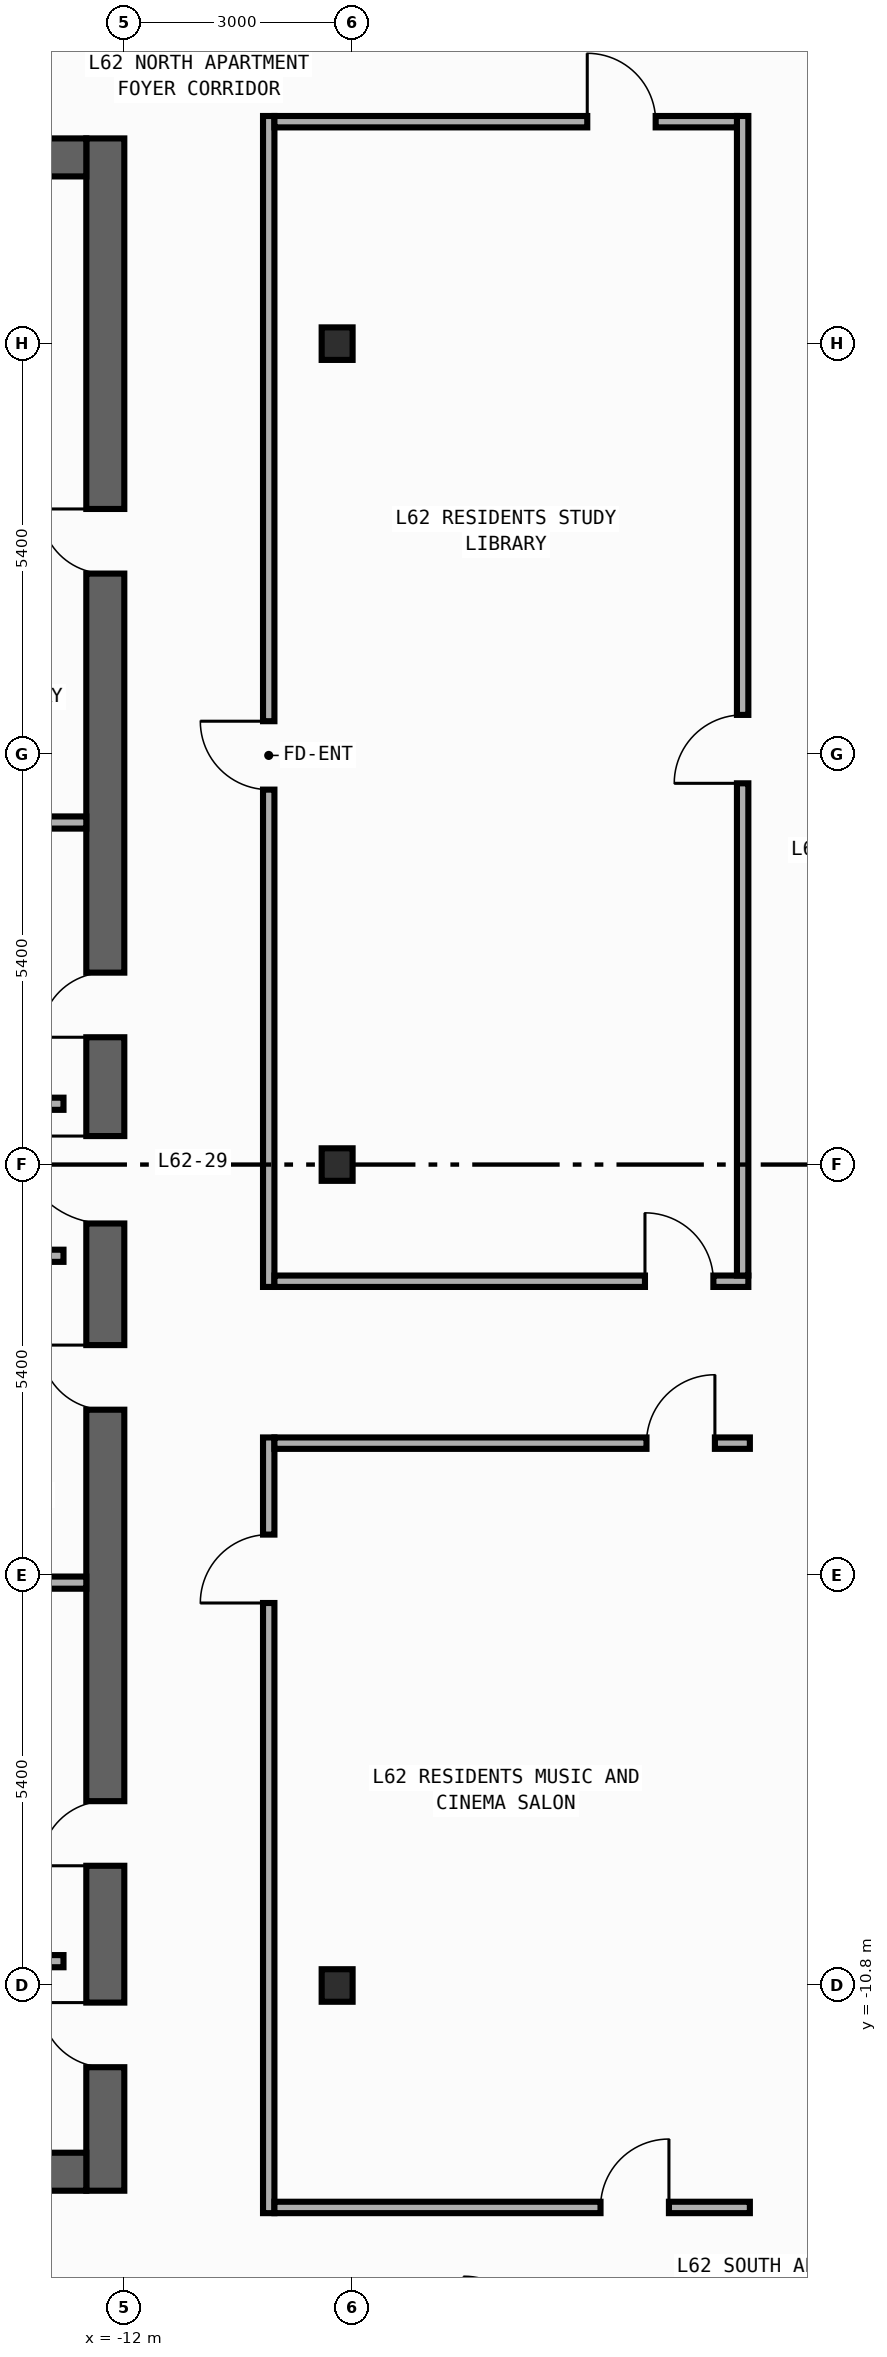
"""IFC4 building model, lengths in metres.
Left out: names, types, materials, properties, quantities, classifications, styles, units other than length and angle.
Written with IfcOpenShell. Run it as: python <this file> out.ifc"""

import sys

from ifc_helpers import new_model, si_unit, direction, frame, frame_2d, origin, origin_2d, place, context, subcontext, project, spatial, rectangle, i_section, extrude, element, fill, save


model = new_model("IFC4")
c1 = context("Model", 3, precision=1e-05, world=origin(), true_north=direction((0.0, 1.0)))
c2 = subcontext(c1, "Body", "Model", "MODEL_VIEW")
j1 = project(units=[si_unit("LENGTHUNIT", "METRE"), si_unit("PLANEANGLEUNIT", "RADIAN")], contexts=[c1])
p1 = place(None, origin())
s1 = spatial("IfcSite", under=j1, at=p1, CompositionType="ELEMENT")
p2 = place(p1, origin())
s2 = spatial("IfcBuilding", under=s1, at=p2, CompositionType="ELEMENT")
p3 = place(p2, frame((0.0, 0.0, 262.0)))
s3 = spatial("IfcBuildingStorey", under=s2, at=p3, CompositionType="ELEMENT", Elevation=262.0)
p4 = place(p3, frame((-12.25, -13.5, 0.0), z_axis=(0.0, 0.0, 1.0), x_axis=(0.0, 1.0, 0.0)))
e1 = element("IfcWall", 1, at=p4, inside=s3, PredefinedType="SHEAR", context=c2, shape_type="SweptSolid", body=[
    extrude(rectangle(XDim=27.0, YDim=0.5, at=frame_2d((13.5, 0.0))), origin(), (0.0, 0.0, 1.0), 3.34),
])
p5 = place(p4, frame((15.175, 0.0, 0.0)))
e2 = element("IfcOpeningElement", 2, at=p5, cuts=e1, PredefinedType="OPENING", context=c2, shape_type="SweptSolid", body=[
    extrude(rectangle(XDim=0.85, YDim=2.1, at=frame_2d((0.425, 1.05))), frame((0.0, 0.26, 0.0), z_axis=(0.0, -1.0, 0.0), x_axis=(1.0, 0.0, 0.0)), (0.0, 0.0, 1.0), 0.52),
])
p6 = place(p4, frame((21.275, 0.0, 0.0)))
e3 = element("IfcOpeningElement", 3, at=p6, cuts=e1, PredefinedType="OPENING", context=c2, shape_type="SweptSolid", body=[
    extrude(rectangle(XDim=0.85, YDim=2.1, at=frame_2d((0.425, 1.05))), frame((0.0, 0.26, 0.0), z_axis=(0.0, -1.0, 0.0), x_axis=(1.0, 0.0, 0.0)), (0.0, 0.0, 1.0), 0.52),
])
p7 = place(p4, frame((4.275, 0.0, 0.0)))
e4 = element("IfcOpeningElement", 4, at=p7, cuts=e1, PredefinedType="OPENING", context=c2, shape_type="SweptSolid", body=[
    extrude(rectangle(XDim=0.85, YDim=2.1, at=frame_2d((0.425, 1.05))), frame((0.0, 0.26, 0.0), z_axis=(0.0, -1.0, 0.0), x_axis=(1.0, 0.0, 0.0)), (0.0, 0.0, 1.0), 0.52),
])
p8 = place(p4, frame((10.275, 0.0, 0.0)))
e5 = element("IfcOpeningElement", 5, at=p8, cuts=e1, PredefinedType="OPENING", context=c2, shape_type="SweptSolid", body=[
    extrude(rectangle(XDim=0.85, YDim=2.1, at=frame_2d((0.425, 1.05))), frame((0.0, 0.26, 0.0), z_axis=(0.0, -1.0, 0.0), x_axis=(1.0, 0.0, 0.0)), (0.0, 0.0, 1.0), 0.52),
])
p9 = place(p4, frame((12.725, 0.0, 0.0)))
e6 = element("IfcOpeningElement", 6, at=p9, cuts=e1, PredefinedType="OPENING", context=c2, shape_type="SweptSolid", body=[
    extrude(rectangle(XDim=1.15, YDim=2.2, at=frame_2d((0.575, 1.1))), frame((0.0, 0.26, 0.0), z_axis=(0.0, -1.0, 0.0), x_axis=(1.0, 0.0, 0.0)), (0.0, 0.0, 1.0), 0.52),
])
p10 = place(p4, frame((1.625, 0.0, 0.0)))
e7 = element("IfcOpeningElement", 7, at=p10, cuts=e1, PredefinedType="OPENING", context=c2, shape_type="SweptSolid", body=[
    extrude(rectangle(XDim=0.85, YDim=2.1, at=frame_2d((0.425, 1.05))), frame((0.0, 0.26, 0.0), z_axis=(0.0, -1.0, 0.0), x_axis=(1.0, 0.0, 0.0)), (0.0, 0.0, 1.0), 0.52),
])
for number, where, z_axis, x_axis in (
    (8, (-19.9, -13.25, 0.0), (0.0, 0.0, 1.0), (1.0, 0.0, 0.0)),
    (9, (-19.9, 13.25, 0.0), (0.0, 0.0, 1.0), (1.0, 0.0, 0.0)),
):
    element("IfcWall", number, at=place(p3, frame(where, z_axis=z_axis, x_axis=x_axis)), inside=s3, PredefinedType="SHEAR", context=c2, shape_type="SweptSolid", body=[
        extrude(rectangle(XDim=7.4, YDim=0.5, at=frame_2d((3.7, 0.0))), origin(), (0.0, 0.0, 1.0), 3.34),
    ])
for number, where, z_axis, x_axis in (
    (10, (-9.2, -10.8, 0.0), (0.0, 0.0, 1.0), (1.0, 0.0, 0.0)),
    (11, (-9.2, 0.0, 0.0), (0.0, 0.0, 1.0), (1.0, 0.0, 0.0)),
    (12, (-9.2, 10.8, 0.0), (0.0, 0.0, 1.0), (1.0, 0.0, 0.0)),
):
    element("IfcColumn", number, at=place(p3, frame(where, z_axis=z_axis, x_axis=x_axis)), inside=s3, PredefinedType="COLUMN", context=c2, shape_type="SweptSolid", body=[
        extrude(i_section(OverallWidth=0.407, OverallDepth=0.428, WebThickness=0.02, FlangeThickness=0.035, FilletRadius=0.022, at=origin_2d()), origin(), (0.0, 0.0, 1.0), 3.6),
    ])
for number, where, z_axis, x_axis in (
    (13, (-15.4, 0.8, 0.0), (0.0, 0.0, 1.0), (1.0, 0.0, 0.0)),
    (14, (-15.4, -1.2, 0.0), (0.0, 0.0, 1.0), (1.0, 0.0, 0.0)),
    (15, (-15.4, -10.48, 0.0), (0.0, 0.0, 1.0), (1.0, 0.0, 0.0)),
):
    element("IfcWall", number, at=place(p3, frame(where, z_axis=z_axis, x_axis=x_axis)), inside=s3, PredefinedType="STANDARD", context=c2, shape_type="SweptSolid", body=[
        extrude(rectangle(XDim=2.6, YDim=0.16, at=frame_2d((1.3, 0.0))), origin(), (0.0, 0.0, 1.0), 3.34),
    ])
for number, where, z_axis, x_axis in (
    (16, (-15.4, 4.5, 0.0), (0.0, 0.0, 1.0), (1.0, 0.0, 0.0)),
    (17, (-15.4, -5.5, 0.0), (0.0, 0.0, 1.0), (1.0, 0.0, 0.0)),
):
    element("IfcWall", number, at=place(p3, frame(where, z_axis=z_axis, x_axis=x_axis)), inside=s3, PredefinedType="PARTITIONING", context=c2, shape_type="SweptSolid", body=[
        extrude(rectangle(XDim=2.9, YDim=0.16, at=frame_2d((1.45, 0.0))), origin(), (0.0, 0.0, 1.0), 3.34),
    ])
p11 = place(p3, frame((-10.1, -1.61, 0.0), z_axis=(0.0, 0.0, 1.0), x_axis=(0.0, 1.0, 0.0)))
e18 = element("IfcWall", 18, at=p11, inside=s3, PredefinedType="PARTITIONING", context=c2, shape_type="SweptSolid", body=[
    extrude(rectangle(XDim=15.405, YDim=0.15, at=frame_2d((7.703, 0.0))), origin(), (0.0, 0.0, 1.0), 3.34),
])
p12 = place(p11, frame((6.543, 0.0, 0.0)))
e19 = element("IfcOpeningElement", 19, at=p12, cuts=e18, PredefinedType="OPENING", context=c2, shape_type="SweptSolid", body=[
    extrude(rectangle(XDim=0.9, YDim=2.15, at=frame_2d((0.45, 1.075))), frame((0.0, 0.085, 0.0), z_axis=(0.0, -1.0, 0.0), x_axis=(1.0, 0.0, 0.0)), (0.0, 0.0, 1.0), 0.17),
])
p13 = place(p3, frame((-10.1, -13.795, 0.0), z_axis=(0.0, 0.0, 1.0), x_axis=(0.0, 1.0, 0.0)))
e20 = element("IfcWall", 20, at=p13, inside=s3, PredefinedType="PARTITIONING", context=c2, shape_type="SweptSolid", body=[
    extrude(rectangle(XDim=10.205, YDim=0.15, at=frame_2d((5.103, 0.0))), origin(), (0.0, 0.0, 1.0), 3.34),
])
p14 = place(p13, frame((8.027, 0.0, 0.0)))
e21 = element("IfcOpeningElement", 21, at=p14, cuts=e20, PredefinedType="OPENING", context=c2, shape_type="SweptSolid", body=[
    extrude(rectangle(XDim=0.9, YDim=2.15, at=frame_2d((0.45, 1.075))), frame((0.0, 0.085, 0.0), z_axis=(0.0, -1.0, 0.0), x_axis=(1.0, 0.0, 0.0)), (0.0, 0.0, 1.0), 0.17),
])
p15 = place(p3, frame((-10.025, -1.535, 0.0), z_axis=(0.0, 0.0, 1.0), x_axis=(1.0, 0.0, 0.0)))
e22 = element("IfcWall", 22, at=p15, inside=s3, PredefinedType="PARTITIONING", context=c2, shape_type="SweptSolid", body=[
    extrude(rectangle(XDim=6.235, YDim=0.15, at=frame_2d((3.117, 0.0))), origin(), (0.0, 0.0, 1.0), 3.34),
])
p16 = place(p15, frame((4.875, 0.0, 0.0)))
e23 = element("IfcOpeningElement", 23, at=p16, cuts=e22, PredefinedType="OPENING", context=c2, shape_type="SweptSolid", body=[
    extrude(rectangle(XDim=0.9, YDim=2.15, at=frame_2d((0.45, 1.075))), frame((0.0, 0.085, 0.0), z_axis=(0.0, -1.0, 0.0), x_axis=(1.0, 0.0, 0.0)), (0.0, 0.0, 1.0), 0.17),
])
p17 = place(p3, frame((-10.025, -3.665, 0.0), z_axis=(0.0, 0.0, 1.0), x_axis=(1.0, 0.0, 0.0)))
e24 = element("IfcWall", 24, at=p17, inside=s3, PredefinedType="PARTITIONING", context=c2, shape_type="SweptSolid", body=[
    extrude(rectangle(XDim=6.255, YDim=0.15, at=frame_2d((3.127, 0.0))), origin(), (0.0, 0.0, 1.0), 3.34),
])
p18 = place(p17, frame((4.895, 0.0, 0.0)))
e25 = element("IfcOpeningElement", 25, at=p18, cuts=e24, PredefinedType="OPENING", context=c2, shape_type="SweptSolid", body=[
    extrude(rectangle(XDim=0.9, YDim=2.15, at=frame_2d((0.45, 1.075))), frame((0.0, 0.085, 0.0), z_axis=(0.0, -1.0, 0.0), x_axis=(1.0, 0.0, 0.0)), (0.0, 0.0, 1.0), 0.17),
])
p19 = place(p3, frame((-3.865, -1.46, 0.0), z_axis=(0.0, 0.0, 1.0), x_axis=(0.0, 1.0, 0.0)))
e26 = element("IfcWall", 26, at=p19, inside=s3, PredefinedType="PARTITIONING", context=c2, shape_type="SweptSolid", body=[
    extrude(rectangle(XDim=15.255, YDim=0.15, at=frame_2d((7.627, 0.0))), origin(), (0.0, 0.0, 1.0), 3.34),
])
p20 = place(p19, frame((6.476, 0.0, 0.0)))
e27 = element("IfcOpeningElement", 27, at=p20, cuts=e26, PredefinedType="OPENING", context=c2, shape_type="SweptSolid", body=[
    extrude(rectangle(XDim=0.9, YDim=2.15, at=frame_2d((0.45, 1.075))), frame((0.0, 0.085, 0.0), z_axis=(0.0, -1.0, 0.0), x_axis=(1.0, 0.0, 0.0)), (0.0, 0.0, 1.0), 0.17),
])
p21 = place(p3, frame((-10.025, 13.72, 0.0), z_axis=(0.0, 0.0, 1.0), x_axis=(1.0, 0.0, 0.0)))
e28 = element("IfcWall", 28, at=p21, inside=s3, PredefinedType="PARTITIONING", context=c2, shape_type="SweptSolid", body=[
    extrude(rectangle(XDim=6.085, YDim=0.15, at=frame_2d((3.042, 0.0))), origin(), (0.0, 0.0, 1.0), 3.34),
])
p22 = place(p21, frame((4.116, 0.0, 0.0)))
e29 = element("IfcOpeningElement", 29, at=p22, cuts=e28, PredefinedType="OPENING", context=c2, shape_type="SweptSolid", body=[
    extrude(rectangle(XDim=0.9, YDim=2.15, at=frame_2d((0.45, 1.075))), frame((0.0, 0.085, 0.0), z_axis=(0.0, -1.0, 0.0), x_axis=(1.0, 0.0, 0.0)), (0.0, 0.0, 1.0), 0.17),
])
p23 = place(p3, frame((-10.025, -13.72, 0.0), z_axis=(0.0, 0.0, 1.0), x_axis=(1.0, 0.0, 0.0)))
e30 = element("IfcWall", 30, at=p23, inside=s3, PredefinedType="PARTITIONING", context=c2, shape_type="SweptSolid", body=[
    extrude(rectangle(XDim=6.255, YDim=0.15, at=frame_2d((3.127, 0.0))), origin(), (0.0, 0.0, 1.0), 3.34),
])
p24 = place(p23, frame((4.29, 0.0, 0.0)))
e31 = element("IfcOpeningElement", 31, at=p24, cuts=e30, PredefinedType="OPENING", context=c2, shape_type="SweptSolid", body=[
    extrude(rectangle(XDim=0.9, YDim=2.15, at=frame_2d((0.45, 1.075))), frame((0.0, 0.085, 0.0), z_axis=(0.0, -1.0, 0.0), x_axis=(1.0, 0.0, 0.0)), (0.0, 0.0, 1.0), 0.17),
])
p25 = place(p5, origin())
e32 = element("IfcDoor", 32, at=p25, inside=s3, OperationType="SINGLE_SWING_LEFT", PredefinedType="DOOR", context=c2, shape_type="SweptSolid", body=[
    extrude(rectangle(XDim=0.85, YDim=2.1, at=frame_2d((0.425, 1.05))), frame((0.0, 0.025, 0.0), z_axis=(0.0, -1.0, 0.0), x_axis=(1.0, 0.0, 0.0)), (0.0, 0.0, 1.0), 0.05),
])
fill(e2, e32)
p26 = place(p6, origin())
e33 = element("IfcDoor", 33, at=p26, inside=s3, OperationType="SINGLE_SWING_RIGHT", PredefinedType="DOOR", context=c2, shape_type="SweptSolid", body=[
    extrude(rectangle(XDim=0.85, YDim=2.1, at=frame_2d((0.425, 1.05))), frame((0.0, 0.025, 0.0), z_axis=(0.0, -1.0, 0.0), x_axis=(1.0, 0.0, 0.0)), (0.0, 0.0, 1.0), 0.05),
])
fill(e3, e33)
p27 = place(p7, origin())
e34 = element("IfcDoor", 34, at=p27, inside=s3, OperationType="SINGLE_SWING_LEFT", PredefinedType="DOOR", context=c2, shape_type="SweptSolid", body=[
    extrude(rectangle(XDim=0.85, YDim=2.1, at=frame_2d((0.425, 1.05))), frame((0.0, 0.025, 0.0), z_axis=(0.0, -1.0, 0.0), x_axis=(1.0, 0.0, 0.0)), (0.0, 0.0, 1.0), 0.05),
])
fill(e4, e34)
p28 = place(p8, origin())
e35 = element("IfcDoor", 35, at=p28, inside=s3, OperationType="SINGLE_SWING_RIGHT", PredefinedType="DOOR", context=c2, shape_type="SweptSolid", body=[
    extrude(rectangle(XDim=0.85, YDim=2.1, at=frame_2d((0.425, 1.05))), frame((0.0, 0.025, 0.0), z_axis=(0.0, -1.0, 0.0), x_axis=(1.0, 0.0, 0.0)), (0.0, 0.0, 1.0), 0.05),
])
fill(e5, e35)
p29 = place(p9, origin())
e36 = element("IfcDoor", 36, at=p29, inside=s3, OperationType="SINGLE_SWING_RIGHT", PredefinedType="DOOR", context=c2, shape_type="SweptSolid", body=[
    extrude(rectangle(XDim=1.15, YDim=2.2, at=frame_2d((0.575, 1.1))), frame((0.0, 0.025, 0.0), z_axis=(0.0, -1.0, 0.0), x_axis=(1.0, 0.0, 0.0)), (0.0, 0.0, 1.0), 0.05),
])
fill(e6, e36)
p30 = place(p10, origin())
e37 = element("IfcDoor", 37, at=p30, inside=s3, OperationType="SINGLE_SWING_RIGHT", PredefinedType="DOOR", context=c2, shape_type="SweptSolid", body=[
    extrude(rectangle(XDim=0.85, YDim=2.1, at=frame_2d((0.425, 1.05))), frame((0.0, 0.025, 0.0), z_axis=(0.0, -1.0, 0.0), x_axis=(1.0, 0.0, 0.0)), (0.0, 0.0, 1.0), 0.05),
])
fill(e7, e37)
p31 = place(p12, origin())
e38 = element("IfcDoor", 38, at=p31, inside=s3, OperationType="SINGLE_SWING_RIGHT", PredefinedType="DOOR", context=c2, shape_type="SweptSolid", body=[
    extrude(rectangle(XDim=0.9, YDim=2.15, at=frame_2d((0.45, 1.075))), frame((0.0, 0.025, 0.0), z_axis=(0.0, -1.0, 0.0), x_axis=(1.0, 0.0, 0.0)), (0.0, 0.0, 1.0), 0.05),
])
fill(e19, e38)
p32 = place(p14, origin())
e39 = element("IfcDoor", 39, at=p32, inside=s3, OperationType="SINGLE_SWING_LEFT", PredefinedType="DOOR", context=c2, shape_type="SweptSolid", body=[
    extrude(rectangle(XDim=0.9, YDim=2.15, at=frame_2d((0.45, 1.075))), frame((0.0, 0.025, 0.0), z_axis=(0.0, -1.0, 0.0), x_axis=(1.0, 0.0, 0.0)), (0.0, 0.0, 1.0), 0.05),
])
fill(e21, e39)
p33 = place(p16, origin())
e40 = element("IfcDoor", 40, at=p33, inside=s3, OperationType="SINGLE_SWING_LEFT", PredefinedType="DOOR", context=c2, shape_type="SweptSolid", body=[
    extrude(rectangle(XDim=0.9, YDim=2.15, at=frame_2d((0.45, 1.075))), frame((0.0, 0.025, 0.0), z_axis=(0.0, -1.0, 0.0), x_axis=(1.0, 0.0, 0.0)), (0.0, 0.0, 1.0), 0.05),
])
fill(e23, e40)
p34 = place(p18, origin())
e41 = element("IfcDoor", 41, at=p34, inside=s3, OperationType="SINGLE_SWING_RIGHT", PredefinedType="DOOR", context=c2, shape_type="SweptSolid", body=[
    extrude(rectangle(XDim=0.9, YDim=2.15, at=frame_2d((0.45, 1.075))), frame((0.0, 0.025, 0.0), z_axis=(0.0, -1.0, 0.0), x_axis=(1.0, 0.0, 0.0)), (0.0, 0.0, 1.0), 0.05),
])
fill(e25, e41)
p35 = place(p20, origin())
e42 = element("IfcDoor", 42, at=p35, inside=s3, OperationType="SINGLE_SWING_LEFT", PredefinedType="DOOR", context=c2, shape_type="SweptSolid", body=[
    extrude(rectangle(XDim=0.9, YDim=2.15, at=frame_2d((0.45, 1.075))), frame((0.0, 0.025, 0.0), z_axis=(0.0, -1.0, 0.0), x_axis=(1.0, 0.0, 0.0)), (0.0, 0.0, 1.0), 0.05),
])
fill(e27, e42)
p36 = place(p22, origin())
e43 = element("IfcDoor", 43, at=p36, inside=s3, OperationType="SINGLE_SWING_LEFT", PredefinedType="DOOR", context=c2, shape_type="SweptSolid", body=[
    extrude(rectangle(XDim=0.9, YDim=2.15, at=frame_2d((0.45, 1.075))), frame((0.0, 0.025, 0.0), z_axis=(0.0, -1.0, 0.0), x_axis=(1.0, 0.0, 0.0)), (0.0, 0.0, 1.0), 0.05),
])
fill(e29, e43)
p37 = place(p24, origin())
e44 = element("IfcDoor", 44, at=p37, inside=s3, OperationType="SINGLE_SWING_RIGHT", PredefinedType="DOOR", context=c2, shape_type="SweptSolid", body=[
    extrude(rectangle(XDim=0.9, YDim=2.15, at=frame_2d((0.45, 1.075))), frame((0.0, 0.025, 0.0), z_axis=(0.0, -1.0, 0.0), x_axis=(1.0, 0.0, 0.0)), (0.0, 0.0, 1.0), 0.05),
])
fill(e31, e44)
save(model, sys.argv[1])
